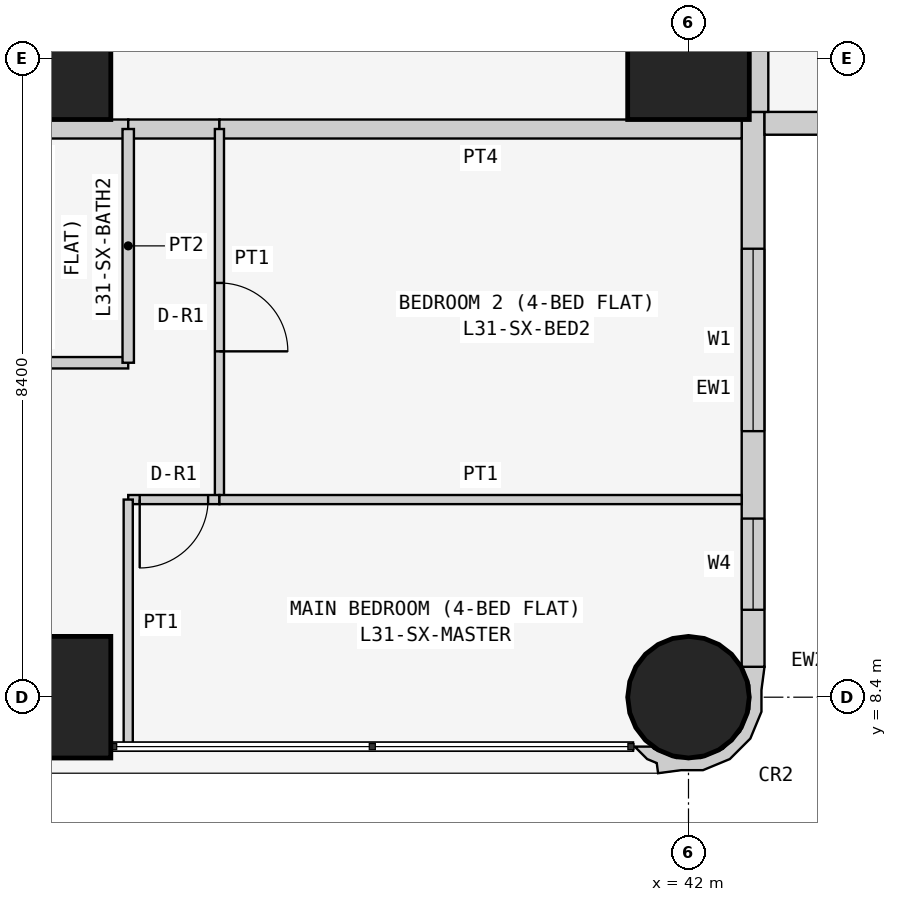
"""IFC4 building model, lengths in metres.
Left out: names, types, materials, properties, quantities, classifications, styles, units other than length and angle.
Written with IfcOpenShell. Run it as: python <this file> out.ifc"""

import sys

from ifc_helpers import new_model, si_unit, direction, frame, frame_2d, origin, origin_2d, place, context, subcontext, project, spatial, polyline, rectangle, circle, outline, extrude, element, fill, save


model = new_model("IFC4")
c1 = context("Model", 3, precision=1e-05, world=origin(), true_north=direction((0.0, 1.0)))
c2 = subcontext(c1, "Body", "Model", "MODEL_VIEW")
j1 = project(units=[si_unit("LENGTHUNIT", "METRE"), si_unit("PLANEANGLEUNIT", "RADIAN")], contexts=[c1])
p1 = place(None, origin())
s1 = spatial("IfcSite", under=j1, at=p1, CompositionType="ELEMENT")
p2 = place(p1, origin())
s2 = spatial("IfcBuilding", under=s1, at=p2, CompositionType="ELEMENT")
p3 = place(p2, frame((0.0, 0.0, 123.3)))
s3 = spatial("IfcBuildingStorey", under=s2, at=p3, CompositionType="ELEMENT", Elevation=123.3)
for number, where, z_axis, x_axis in (
    (1, (33.6, 8.4, 0.0), (0.0, 0.0, 1.0), (1.0, 0.0, 0.0)),
    (2, (33.6, 16.8, 0.0), (0.0, 0.0, 1.0), (1.0, 0.0, 0.0)),
):
    element("IfcColumn", number, at=place(p3, frame(where, z_axis=z_axis, x_axis=x_axis)), inside=s3, PredefinedType="COLUMN", context=c2, shape_type="SweptSolid", body=[
        extrude(rectangle(XDim=1.6, YDim=1.6, at=origin_2d()), origin(), (0.0, 0.0, 1.0), 3.6),
    ])
p4 = place(p3, frame((42.0, 8.4, 0.0), z_axis=(0.0, 0.0, 1.0), x_axis=(1.0, 0.0, 0.0)))
e3 = element("IfcColumn", 3, at=p4, inside=s3, PredefinedType="COLUMN", context=c2, shape_type="SweptSolid", body=[
    extrude(circle(Radius=0.8, at=origin_2d()), origin(), (0.0, 0.0, 1.0), 3.6),
])
p5 = place(p3, frame((42.0, 16.8, 0.0), z_axis=(0.0, 0.0, 1.0), x_axis=(1.0, 0.0, 0.0)))
e4 = element("IfcColumn", 4, at=p5, inside=s3, PredefinedType="COLUMN", context=c2, shape_type="SweptSolid", body=[
    extrude(rectangle(XDim=1.6, YDim=1.6, at=origin_2d()), origin(), (0.0, 0.0, 1.0), 3.6),
])
p6 = place(p3, frame((42.85, 8.8, 0.0), z_axis=(0.0, 0.0, 1.0), x_axis=(0.0, 1.0, 0.0)))
e5 = element("IfcWall", 5, at=p6, inside=s3, PredefinedType="SOLIDWALL", context=c2, shape_type="SweptSolid", body=[
    extrude(rectangle(XDim=7.3, YDim=0.3, at=frame_2d((3.65, 0.0))), origin(), (0.0, 0.0, 1.0), 3.45),
])
p7 = place(p6, frame((3.1, 0.0, 0.9)))
e6 = element("IfcOpeningElement", 6, at=p7, cuts=e5, PredefinedType="OPENING", context=c2, shape_type="SweptSolid", body=[
    extrude(rectangle(XDim=2.4, YDim=1.5, at=frame_2d((1.2, 0.75))), frame((0.0, 0.16, 0.0), z_axis=(0.0, -1.0, 0.0), x_axis=(1.0, 0.0, 0.0)), (0.0, 0.0, 1.0), 0.32),
])
p8 = place(p6, frame((0.75, 0.0, 0.9)))
e7 = element("IfcOpeningElement", 7, at=p8, cuts=e5, PredefinedType="OPENING", context=c2, shape_type="SweptSolid", body=[
    extrude(rectangle(XDim=1.2, YDim=1.5, at=frame_2d((0.6, 0.75))), frame((0.0, 0.16, 0.0), z_axis=(0.0, -1.0, 0.0), x_axis=(1.0, 0.0, 0.0)), (0.0, 0.0, 1.0), 0.32),
])
p9 = place(p3, frame((43.0, 15.95, 0.0), z_axis=(0.0, 0.0, 1.0), x_axis=(1.0, 0.0, 0.0)))
e8 = element("IfcWall", 8, at=p9, inside=s3, PredefinedType="SOLIDWALL", context=c2, shape_type="SweptSolid", body=[
    extrude(rectangle(XDim=15.4, YDim=0.3, at=frame_2d((7.7, 0.0))), origin(), (0.0, 0.0, 1.0), 3.45),
])
p10 = place(p9, frame((1.2, 0.0, 0.9)))
e9 = element("IfcOpeningElement", 9, at=p10, cuts=e8, PredefinedType="OPENING", context=c2, shape_type="SweptSolid", body=[
    extrude(rectangle(XDim=1.8, YDim=1.5, at=frame_2d((0.9, 0.75))), frame((0.0, 0.16, 0.0), z_axis=(0.0, -1.0, 0.0), x_axis=(1.0, 0.0, 0.0)), (0.0, 0.0, 1.0), 0.32),
])
p11 = place(p9, frame((4.95, 0.0, 1.5)))
e10 = element("IfcOpeningElement", 10, at=p11, cuts=e8, PredefinedType="OPENING", context=c2, shape_type="SweptSolid", body=[
    extrude(rectangle(XDim=0.9, YDim=0.7, at=frame_2d((0.45, 0.35))), frame((0.0, 0.16, 0.0), z_axis=(0.0, -1.0, 0.0), x_axis=(1.0, 0.0, 0.0)), (0.0, 0.0, 1.0), 0.32),
])
p12 = place(p9, frame((8.5, 0.0, 0.9)))
e11 = element("IfcOpeningElement", 11, at=p12, cuts=e8, PredefinedType="OPENING", context=c2, shape_type="SweptSolid", body=[
    extrude(rectangle(XDim=1.8, YDim=1.5, at=frame_2d((0.9, 0.75))), frame((0.0, 0.16, 0.0), z_axis=(0.0, -1.0, 0.0), x_axis=(1.0, 0.0, 0.0)), (0.0, 0.0, 1.0), 0.32),
])
p13 = place(p9, frame((12.5, 0.0, 0.0)))
e12 = element("IfcOpeningElement", 12, at=p13, cuts=e8, PredefinedType="OPENING", context=c2, shape_type="SweptSolid", body=[
    extrude(rectangle(XDim=0.9, YDim=2.4, at=frame_2d((0.45, 1.2))), frame((0.0, 0.16, 0.0), z_axis=(0.0, -1.0, 0.0), x_axis=(1.0, 0.0, 0.0)), (0.0, 0.0, 1.0), 0.32),
])
p14 = place(p9, frame((13.5, 0.0, 0.9)))
e13 = element("IfcOpeningElement", 13, at=p14, cuts=e8, PredefinedType="OPENING", context=c2, shape_type="SweptSolid", body=[
    extrude(rectangle(XDim=1.2, YDim=1.5, at=frame_2d((0.6, 0.75))), frame((0.0, 0.16, 0.0), z_axis=(0.0, -1.0, 0.0), x_axis=(1.0, 0.0, 0.0)), (0.0, 0.0, 1.0), 0.32),
])
p15 = place(p3, frame((41.352, 7.805, 0.0), z_axis=(0.0, 0.0, 1.0), x_axis=(0.343276641956, -0.93923434088, 0.0)))
e14 = element("IfcWall", 14, at=p15, inside=s3, PredefinedType="SOLIDWALL", context=c2, shape_type="SweptSolid", body=[
    extrude(outline(polyline([(-0.369, 1.89), (-0.509, 1.621), (-0.49, 1.615), (-0.479, 1.609), (-0.211, 1.62), (0.088, 1.511), (0.323, 1.295), (0.457, 1.006), (0.47, 0.688), (0.361, 0.389), (0.145, 0.154), (0.108, 0.136), (0.031, -0.075), (0.241, 0.023), (0.333, 0.124), (0.465, 0.094), (0.532, 0.393), (0.631, 0.663), (0.614, 1.044), (0.453, 1.391), (0.172, 1.649), (-0.097, 1.748), (-0.369, 1.89)])), origin(), (0.0, 0.0, 1.0), 3.45),
])
p16 = place(p3, frame((42.925, 22.971, 0.0), z_axis=(0.0, 0.0, 1.0), x_axis=(0.0, -1.0, 0.0)))
e15 = element("IfcWall", 15, at=p16, inside=s3, PredefinedType="PARTITIONING", context=c2, shape_type="SweptSolid", body=[
    extrude(rectangle(XDim=6.871, YDim=0.25, at=frame_2d((3.436, 0.0))), origin(), (0.0, 0.0, 1.0), 3.45),
])
p17 = place(p3, frame((34.629, 15.875, 0.0), z_axis=(0.0, 0.0, 1.0), x_axis=(-1.0, 0.0, 0.0)))
e16 = element("IfcWall", 16, at=p17, inside=s3, PredefinedType="PARTITIONING", context=c2, shape_type="SweptSolid", body=[
    extrude(rectangle(XDim=2.629, YDim=0.25, at=frame_2d((1.314, 0.0))), origin(), (0.0, 0.0, 1.0), 3.45),
])
p18 = place(p3, frame((35.829, 15.875, 0.0), z_axis=(0.0, 0.0, 1.0), x_axis=(-1.0, 0.0, 0.0)))
e17 = element("IfcWall", 17, at=p18, inside=s3, PredefinedType="PARTITIONING", context=c2, shape_type="SweptSolid", body=[
    extrude(rectangle(XDim=1.2, YDim=0.25, at=frame_2d((0.6, 0.0))), origin(), (0.0, 0.0, 1.0), 3.45),
])
p19 = place(p3, frame((42.7, 15.875, 0.0), z_axis=(0.0, 0.0, 1.0), x_axis=(-1.0, 0.0, 0.0)))
e18 = element("IfcWall", 18, at=p19, inside=s3, PredefinedType="PARTITIONING", context=c2, shape_type="SweptSolid", body=[
    extrude(rectangle(XDim=6.871, YDim=0.25, at=frame_2d((3.436, 0.0))), origin(), (0.0, 0.0, 1.0), 3.45),
])
p20 = place(p3, frame((32.0, 12.8, 0.0), z_axis=(0.0, 0.0, 1.0), x_axis=(1.0, 0.0, 0.0)))
e19 = element("IfcWall", 19, at=p20, inside=s3, PredefinedType="PARTITIONING", context=c2, shape_type="SweptSolid", body=[
    extrude(rectangle(XDim=2.629, YDim=0.15, at=frame_2d((1.314, 0.0))), origin(), (0.0, 0.0, 1.0), 3.45),
])
p21 = place(p3, frame((34.629, 12.8, 0.0), z_axis=(0.0, 0.0, 1.0), x_axis=(0.0, 1.0, 0.0)))
e20 = element("IfcWall", 20, at=p21, inside=s3, PredefinedType="PARTITIONING", context=c2, shape_type="SweptSolid", body=[
    extrude(rectangle(XDim=3.075, YDim=0.15, at=frame_2d((1.538, 0.0))), origin(), (0.0, 0.0, 1.0), 3.45),
])
p22 = place(p3, frame((35.829, 15.875, 0.0), z_axis=(0.0, 0.0, 1.0), x_axis=(0.0, -1.0, 0.0)))
e21 = element("IfcWall", 21, at=p22, inside=s3, PredefinedType="PARTITIONING", context=c2, shape_type="SweptSolid", body=[
    extrude(rectangle(XDim=4.875, YDim=0.12, at=frame_2d((2.438, 0.0))), origin(), (0.0, 0.0, 1.0), 3.45),
])
p23 = place(p22, frame((2.025, 0.0, 0.0)))
e22 = element("IfcOpeningElement", 22, at=p23, cuts=e21, PredefinedType="OPENING", context=c2, shape_type="SweptSolid", body=[
    extrude(rectangle(XDim=0.9, YDim=2.1, at=frame_2d((0.45, 1.05))), frame((0.0, 0.07, 0.0), z_axis=(0.0, -1.0, 0.0), x_axis=(1.0, 0.0, 0.0)), (0.0, 0.0, 1.0), 0.14),
])
p24 = place(p3, frame((35.829, 11.0, 0.0), z_axis=(0.0, 0.0, 1.0), x_axis=(-1.0, 0.0, 0.0)))
e23 = element("IfcWall", 23, at=p24, inside=s3, PredefinedType="PARTITIONING", context=c2, shape_type="SweptSolid", body=[
    extrude(rectangle(XDim=1.2, YDim=0.12, at=frame_2d((0.6, 0.0))), origin(), (0.0, 0.0, 1.0), 3.45),
])
p25 = place(p24, frame((0.149, 0.0, 0.0)))
e24 = element("IfcOpeningElement", 24, at=p25, cuts=e23, PredefinedType="OPENING", context=c2, shape_type="SweptSolid", body=[
    extrude(rectangle(XDim=0.9, YDim=2.1, at=frame_2d((0.45, 1.05))), frame((0.0, 0.07, 0.0), z_axis=(0.0, -1.0, 0.0), x_axis=(1.0, 0.0, 0.0)), (0.0, 0.0, 1.0), 0.14),
])
p26 = place(p3, frame((34.629, 11.0, 0.0), z_axis=(0.0, 0.0, 1.0), x_axis=(0.0, -1.0, 0.0)))
e25 = element("IfcWall", 25, at=p26, inside=s3, PredefinedType="PARTITIONING", context=c2, shape_type="SweptSolid", body=[
    extrude(rectangle(XDim=3.25, YDim=0.12, at=frame_2d((1.625, 0.0))), origin(), (0.0, 0.0, 1.0), 3.45),
])
p27 = place(p3, frame((35.829, 11.0, 0.0), z_axis=(0.0, 0.0, 1.0), x_axis=(1.0, 0.0, 0.0)))
e26 = element("IfcWall", 26, at=p27, inside=s3, PredefinedType="PARTITIONING", context=c2, shape_type="SweptSolid", body=[
    extrude(rectangle(XDim=6.871, YDim=0.12, at=frame_2d((3.436, 0.0))), origin(), (0.0, 0.0, 1.0), 3.45),
])
p28 = place(p7, origin())
e27 = element("IfcWindow", 27, at=p28, inside=s3, PartitioningType="SINGLE_PANEL", PredefinedType="WINDOW", context=c2, shape_type="SweptSolid", body=[
    extrude(rectangle(XDim=2.4, YDim=1.5, at=frame_2d((1.2, 0.75))), frame((0.0, 0.03, 0.0), z_axis=(0.0, -1.0, 0.0), x_axis=(1.0, 0.0, 0.0)), (0.0, 0.0, 1.0), 0.06),
])
fill(e6, e27)
p29 = place(p8, origin())
e28 = element("IfcWindow", 28, at=p29, inside=s3, PartitioningType="SINGLE_PANEL", PredefinedType="WINDOW", context=c2, shape_type="SweptSolid", body=[
    extrude(rectangle(XDim=1.2, YDim=1.5, at=frame_2d((0.6, 0.75))), frame((0.0, 0.03, 0.0), z_axis=(0.0, -1.0, 0.0), x_axis=(1.0, 0.0, 0.0)), (0.0, 0.0, 1.0), 0.06),
])
fill(e7, e28)
p30 = place(p23, origin())
e29 = element("IfcDoor", 29, at=p30, inside=s3, OperationType="SINGLE_SWING_RIGHT", PredefinedType="DOOR", context=c2, shape_type="SweptSolid", body=[
    extrude(rectangle(XDim=0.9, YDim=2.1, at=frame_2d((0.45, 1.05))), frame((0.0, 0.025, 0.0), z_axis=(0.0, -1.0, 0.0), x_axis=(1.0, 0.0, 0.0)), (0.0, 0.0, 1.0), 0.05),
])
fill(e22, e29)
p31 = place(p25, origin())
e30 = element("IfcDoor", 30, at=p31, inside=s3, OperationType="SINGLE_SWING_RIGHT", PredefinedType="DOOR", context=c2, shape_type="SweptSolid", body=[
    extrude(rectangle(XDim=0.9, YDim=2.1, at=frame_2d((0.45, 1.05))), frame((0.0, 0.025, 0.0), z_axis=(0.0, -1.0, 0.0), x_axis=(1.0, 0.0, 0.0)), (0.0, 0.0, 1.0), 0.05),
])
fill(e24, e30)
save(model, sys.argv[1])
